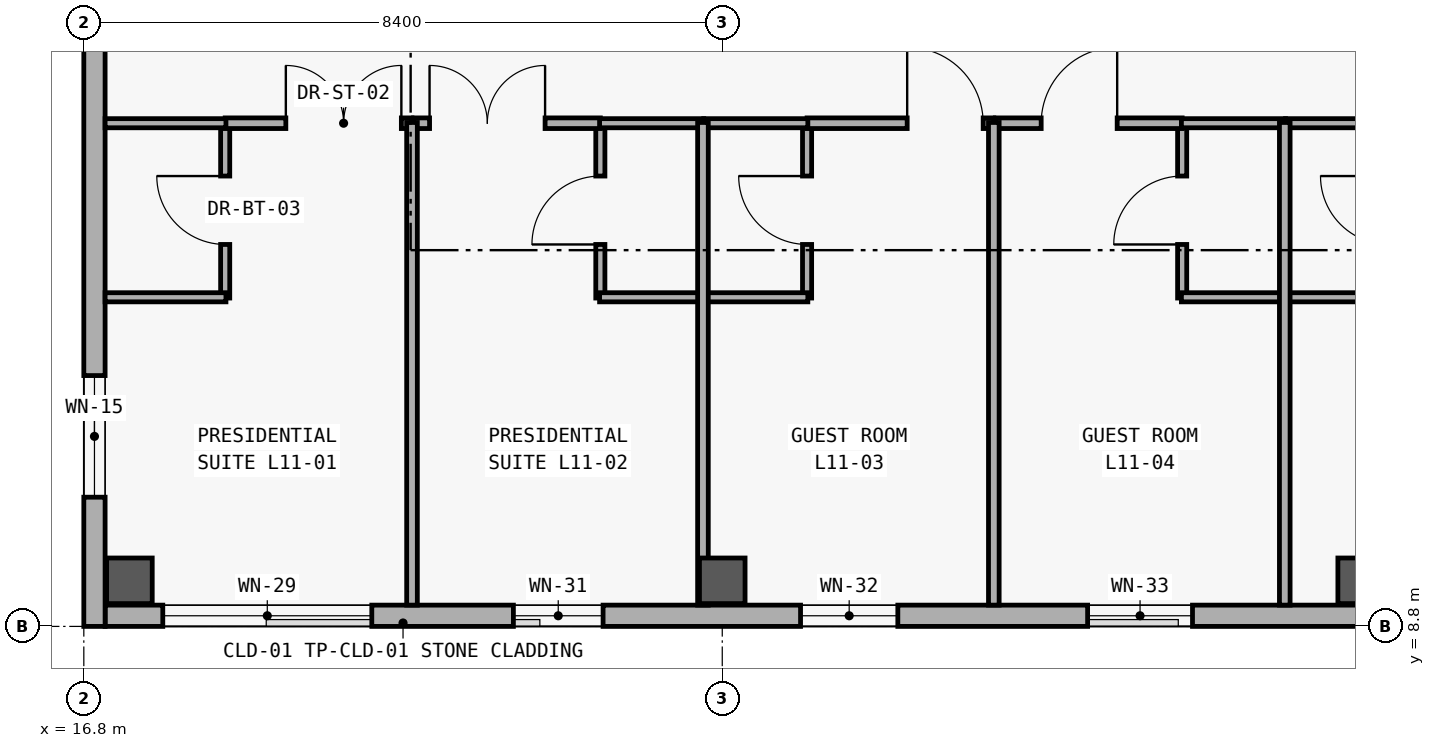
"""IFC4 building model, lengths in metres.
Left out: names, types, materials, properties, quantities, classifications, styles, units other than length and angle.
Written with IfcOpenShell. Run it as: python <this file> out.ifc"""

import sys

from ifc_helpers import new_model, si_unit, direction, frame, frame_2d, origin, origin_2d, place, context, subcontext, project, spatial, rectangle, extrude, element, fill, save


model = new_model("IFC4")
c1 = context("Model", 3, precision=1e-05, world=origin(), true_north=direction((0.0, 1.0)))
c2 = subcontext(c1, "Body", "Model", "MODEL_VIEW")
j1 = project(units=[si_unit("LENGTHUNIT", "METRE"), si_unit("PLANEANGLEUNIT", "RADIAN")], contexts=[c1])
p1 = place(None, origin())
s1 = spatial("IfcSite", under=j1, at=p1, CompositionType="ELEMENT")
p2 = place(p1, origin())
s2 = spatial("IfcBuilding", under=s1, at=p2, CompositionType="ELEMENT")
p3 = place(p2, frame((0.0, 0.0, 44.4)))
s3 = spatial("IfcBuildingStorey", under=s2, at=p3, CompositionType="ELEMENT", Elevation=44.4)
for number, where, z_axis, x_axis in (
    (1, (17.4, 9.4, 0.0), (0.0, 0.0, 1.0), (1.0, 0.0, 0.0)),
    (2, (25.2, 9.4, 0.0), (0.0, 0.0, 1.0), (1.0, 0.0, 0.0)),
    (3, (33.6, 9.4, 0.0), (0.0, 0.0, 1.0), (1.0, 0.0, 0.0)),
):
    element("IfcColumn", number, at=place(p3, frame(where, z_axis=z_axis, x_axis=x_axis)), inside=s3, PredefinedType="COLUMN", context=c2, shape_type="SweptSolid", body=[
        extrude(rectangle(XDim=0.6, YDim=0.6, at=origin_2d()), origin(), (0.0, 0.0, 1.0), 4.2),
    ])
p4 = place(p3, frame((66.92, 8.94, 0.0), z_axis=(0.0, 0.0, 1.0), x_axis=(-1.0, 0.0, 0.0)))
e4 = element("IfcWall", 4, at=p4, inside=s3, PredefinedType="SOLIDWALL", context=c2, shape_type="SweptSolid", body=[
    extrude(rectangle(XDim=49.84, YDim=0.28, at=frame_2d((24.92, 0.0))), origin(), (0.0, 0.0, 1.0), 3.96),
])
p5 = place(p4, frame((6.82, 0.0, 0.85)))
e5 = element("IfcOpeningElement", 5, at=p5, cuts=e4, PredefinedType="OPENING", context=c2, shape_type="SweptSolid", body=[
    extrude(rectangle(XDim=1.5, YDim=1.75, at=frame_2d((0.75, 0.875))), frame((0.0, 0.15, 0.0), z_axis=(0.0, -1.0, 0.0), x_axis=(1.0, 0.0, 0.0)), (0.0, 0.0, 1.0), 0.3),
])
p6 = place(p4, frame((46.331, 0.0, 0.85)))
e6 = element("IfcOpeningElement", 6, at=p6, cuts=e4, PredefinedType="OPENING", context=c2, shape_type="SweptSolid", body=[
    extrude(rectangle(XDim=2.75, YDim=2.1, at=frame_2d((1.375, 1.05))), frame((0.0, 0.15, 0.0), z_axis=(0.0, -1.0, 0.0), x_axis=(1.0, 0.0, 0.0)), (0.0, 0.0, 1.0), 0.3),
])
p7 = place(p4, frame((43.288, 0.0, 0.85)))
e7 = element("IfcOpeningElement", 7, at=p7, cuts=e4, PredefinedType="OPENING", context=c2, shape_type="SweptSolid", body=[
    extrude(rectangle(XDim=1.18, YDim=1.5, at=frame_2d((0.59, 0.75))), frame((0.0, 0.15, 0.0), z_axis=(0.0, -1.0, 0.0), x_axis=(1.0, 0.0, 0.0)), (0.0, 0.0, 1.0), 0.3),
])
p8 = place(p4, frame((39.41, 0.0, 0.85)))
e8 = element("IfcOpeningElement", 8, at=p8, cuts=e4, PredefinedType="OPENING", context=c2, shape_type="SweptSolid", body=[
    extrude(rectangle(XDim=1.28, YDim=1.6, at=frame_2d((0.64, 0.8))), frame((0.0, 0.15, 0.0), z_axis=(0.0, -1.0, 0.0), x_axis=(1.0, 0.0, 0.0)), (0.0, 0.0, 1.0), 0.3),
])
p9 = place(p4, frame((35.533, 0.0, 0.85)))
e9 = element("IfcOpeningElement", 9, at=p9, cuts=e4, PredefinedType="OPENING", context=c2, shape_type="SweptSolid", body=[
    extrude(rectangle(XDim=1.38, YDim=1.7, at=frame_2d((0.69, 0.85))), frame((0.0, 0.15, 0.0), z_axis=(0.0, -1.0, 0.0), x_axis=(1.0, 0.0, 0.0)), (0.0, 0.0, 1.0), 0.3),
])
p10 = place(p4, frame((31.655, 0.0, 0.85)))
e10 = element("IfcOpeningElement", 10, at=p10, cuts=e4, PredefinedType="OPENING", context=c2, shape_type="SweptSolid", body=[
    extrude(rectangle(XDim=1.48, YDim=1.8, at=frame_2d((0.74, 0.9))), frame((0.0, 0.15, 0.0), z_axis=(0.0, -1.0, 0.0), x_axis=(1.0, 0.0, 0.0)), (0.0, 0.0, 1.0), 0.3),
])
p11 = place(p4, frame((27.777, 0.0, 0.85)))
e11 = element("IfcOpeningElement", 11, at=p11, cuts=e4, PredefinedType="OPENING", context=c2, shape_type="SweptSolid", body=[
    extrude(rectangle(XDim=1.58, YDim=1.85, at=frame_2d((0.79, 0.925))), frame((0.0, 0.15, 0.0), z_axis=(0.0, -1.0, 0.0), x_axis=(1.0, 0.0, 0.0)), (0.0, 0.0, 1.0), 0.3),
])
p12 = place(p4, frame((23.899, 0.0, 0.85)))
e12 = element("IfcOpeningElement", 12, at=p12, cuts=e4, PredefinedType="OPENING", context=c2, shape_type="SweptSolid", body=[
    extrude(rectangle(XDim=1.68, YDim=1.9, at=frame_2d((0.84, 0.95))), frame((0.0, 0.15, 0.0), z_axis=(0.0, -1.0, 0.0), x_axis=(1.0, 0.0, 0.0)), (0.0, 0.0, 1.0), 0.3),
])
p13 = place(p4, frame((20.022, 0.0, 0.85)))
e13 = element("IfcOpeningElement", 13, at=p13, cuts=e4, PredefinedType="OPENING", context=c2, shape_type="SweptSolid", body=[
    extrude(rectangle(XDim=1.78, YDim=1.95, at=frame_2d((0.89, 0.975))), frame((0.0, 0.15, 0.0), z_axis=(0.0, -1.0, 0.0), x_axis=(1.0, 0.0, 0.0)), (0.0, 0.0, 1.0), 0.3),
])
p14 = place(p4, frame((16.144, 0.0, 0.85)))
e14 = element("IfcOpeningElement", 14, at=p14, cuts=e4, PredefinedType="OPENING", context=c2, shape_type="SweptSolid", body=[
    extrude(rectangle(XDim=1.88, YDim=1.95, at=frame_2d((0.94, 0.975))), frame((0.0, 0.15, 0.0), z_axis=(0.0, -1.0, 0.0), x_axis=(1.0, 0.0, 0.0)), (0.0, 0.0, 1.0), 0.3),
])
p15 = place(p3, frame((16.94, 8.8, 0.0), z_axis=(0.0, 0.0, 1.0), x_axis=(0.0, 1.0, 0.0)))
e15 = element("IfcWall", 15, at=p15, inside=s3, PredefinedType="SOLIDWALL", context=c2, shape_type="SweptSolid", body=[
    extrude(rectangle(XDim=25.2, YDim=0.28, at=frame_2d((12.6, 0.0))), origin(), (0.0, 0.0, 1.0), 3.96),
])
p16 = place(p15, frame((1.7, 0.0, 0.95)))
e16 = element("IfcOpeningElement", 16, at=p16, cuts=e15, PredefinedType="OPENING", context=c2, shape_type="SweptSolid", body=[
    extrude(rectangle(XDim=1.6, YDim=1.6, at=frame_2d((0.8, 0.8))), frame((0.0, 0.15, 0.0), z_axis=(0.0, -1.0, 0.0), x_axis=(1.0, 0.0, 0.0)), (0.0, 0.0, 1.0), 0.3),
])
p17 = place(p3, frame((18.66, 13.12, 0.0), z_axis=(0.0, 0.0, 1.0), x_axis=(0.0, 1.0, 0.0)))
e17 = element("IfcWall", 17, at=p17, inside=s3, PredefinedType="PARTITIONING", context=c2, shape_type="SweptSolid", body=[
    extrude(rectangle(XDim=2.31, YDim=0.12, at=frame_2d((1.155, 0.0))), origin(), (0.0, 0.0, 1.0), 3.06),
])
p18 = place(p17, frame((0.705, 0.0, 0.0)))
e18 = element("IfcOpeningElement", 18, at=p18, cuts=e17, PredefinedType="OPENING", context=c2, shape_type="SweptSolid", body=[
    extrude(rectangle(XDim=0.9, YDim=2.18, at=frame_2d((0.45, 1.09))), frame((0.0, 0.07, 0.0), z_axis=(0.0, -1.0, 0.0), x_axis=(1.0, 0.0, 0.0)), (0.0, 0.0, 1.0), 0.14),
])
p19 = place(p3, frame((23.596, 13.12, 0.0), z_axis=(0.0, 0.0, 1.0), x_axis=(0.0, 1.0, 0.0)))
e19 = element("IfcWall", 19, at=p19, inside=s3, PredefinedType="PARTITIONING", context=c2, shape_type="SweptSolid", body=[
    extrude(rectangle(XDim=2.31, YDim=0.12, at=frame_2d((1.155, 0.0))), origin(), (0.0, 0.0, 1.0), 3.06),
])
p20 = place(p19, frame((0.705, 0.0, 0.0)))
e20 = element("IfcOpeningElement", 20, at=p20, cuts=e19, PredefinedType="OPENING", context=c2, shape_type="SweptSolid", body=[
    extrude(rectangle(XDim=0.9, YDim=2.18, at=frame_2d((0.45, 1.09))), frame((0.0, 0.07, 0.0), z_axis=(0.0, -1.0, 0.0), x_axis=(1.0, 0.0, 0.0)), (0.0, 0.0, 1.0), 0.14),
])
p21 = place(p3, frame((26.316, 13.12, 0.0), z_axis=(0.0, 0.0, 1.0), x_axis=(0.0, 1.0, 0.0)))
e21 = element("IfcWall", 21, at=p21, inside=s3, PredefinedType="PARTITIONING", context=c2, shape_type="SweptSolid", body=[
    extrude(rectangle(XDim=2.31, YDim=0.12, at=frame_2d((1.155, 0.0))), origin(), (0.0, 0.0, 1.0), 3.06),
])
p22 = place(p21, frame((0.705, 0.0, 0.0)))
e22 = element("IfcOpeningElement", 22, at=p22, cuts=e21, PredefinedType="OPENING", context=c2, shape_type="SweptSolid", body=[
    extrude(rectangle(XDim=0.9, YDim=2.18, at=frame_2d((0.45, 1.09))), frame((0.0, 0.07, 0.0), z_axis=(0.0, -1.0, 0.0), x_axis=(1.0, 0.0, 0.0)), (0.0, 0.0, 1.0), 0.14),
])
p23 = place(p3, frame((31.251, 13.12, 0.0), z_axis=(0.0, 0.0, 1.0), x_axis=(0.0, 1.0, 0.0)))
e23 = element("IfcWall", 23, at=p23, inside=s3, PredefinedType="PARTITIONING", context=c2, shape_type="SweptSolid", body=[
    extrude(rectangle(XDim=2.31, YDim=0.12, at=frame_2d((1.155, 0.0))), origin(), (0.0, 0.0, 1.0), 3.06),
])
p24 = place(p23, frame((0.705, 0.0, 0.0)))
e24 = element("IfcOpeningElement", 24, at=p24, cuts=e23, PredefinedType="OPENING", context=c2, shape_type="SweptSolid", body=[
    extrude(rectangle(XDim=0.9, YDim=2.18, at=frame_2d((0.45, 1.09))), frame((0.0, 0.07, 0.0), z_axis=(0.0, -1.0, 0.0), x_axis=(1.0, 0.0, 0.0)), (0.0, 0.0, 1.0), 0.14),
])
p25 = place(p3, frame((18.66, 15.42, 0.0), z_axis=(0.0, 0.0, 1.0), x_axis=(1.0, 0.0, 0.0)))
e25 = element("IfcWall", 25, at=p25, inside=s3, PredefinedType="PARTITIONING", context=c2, shape_type="SweptSolid", body=[
    extrude(rectangle(XDim=2.458, YDim=0.14, at=frame_2d((1.229, 0.0))), origin(), (0.0, 0.0, 1.0), 3.06),
])
p26 = place(p25, frame((0.798, 0.0, 0.0)))
e26 = element("IfcOpeningElement", 26, at=p26, cuts=e25, PredefinedType="OPENING", context=c2, shape_type="SweptSolid", body=[
    extrude(rectangle(XDim=1.52, YDim=2.35, at=frame_2d((0.76, 1.175))), frame((0.0, 0.08, 0.0), z_axis=(0.0, -1.0, 0.0), x_axis=(1.0, 0.0, 0.0)), (0.0, 0.0, 1.0), 0.16),
])
p27 = place(p3, frame((21.138, 15.42, 0.0), z_axis=(0.0, 0.0, 1.0), x_axis=(1.0, 0.0, 0.0)))
e27 = element("IfcWall", 27, at=p27, inside=s3, PredefinedType="PARTITIONING", context=c2, shape_type="SweptSolid", body=[
    extrude(rectangle(XDim=2.458, YDim=0.14, at=frame_2d((1.229, 0.0))), origin(), (0.0, 0.0, 1.0), 3.06),
])
p28 = place(p27, frame((0.211, 0.0, 0.0)))
e28 = element("IfcOpeningElement", 28, at=p28, cuts=e27, PredefinedType="OPENING", context=c2, shape_type="SweptSolid", body=[
    extrude(rectangle(XDim=1.52, YDim=2.35, at=frame_2d((0.76, 1.175))), frame((0.0, 0.08, 0.0), z_axis=(0.0, -1.0, 0.0), x_axis=(1.0, 0.0, 0.0)), (0.0, 0.0, 1.0), 0.16),
])
p29 = place(p3, frame((26.316, 15.42, 0.0), z_axis=(0.0, 0.0, 1.0), x_axis=(1.0, 0.0, 0.0)))
e29 = element("IfcWall", 29, at=p29, inside=s3, PredefinedType="PARTITIONING", context=c2, shape_type="SweptSolid", body=[
    extrude(rectangle(XDim=2.457, YDim=0.14, at=frame_2d((1.229, 0.0))), origin(), (0.0, 0.0, 1.0), 3.06),
])
p30 = place(p29, frame((1.317, 0.0, 0.0)))
e30 = element("IfcOpeningElement", 30, at=p30, cuts=e29, PredefinedType="OPENING", context=c2, shape_type="SweptSolid", body=[
    extrude(rectangle(XDim=1.0, YDim=2.28, at=frame_2d((0.5, 1.14))), frame((0.0, 0.08, 0.0), z_axis=(0.0, -1.0, 0.0), x_axis=(1.0, 0.0, 0.0)), (0.0, 0.0, 1.0), 0.16),
])
p31 = place(p3, frame((28.793, 15.42, 0.0), z_axis=(0.0, 0.0, 1.0), x_axis=(1.0, 0.0, 0.0)))
e31 = element("IfcWall", 31, at=p31, inside=s3, PredefinedType="PARTITIONING", context=c2, shape_type="SweptSolid", body=[
    extrude(rectangle(XDim=2.458, YDim=0.14, at=frame_2d((1.229, 0.0))), origin(), (0.0, 0.0, 1.0), 3.06),
])
p32 = place(p31, frame((0.603, 0.0, 0.0)))
e32 = element("IfcOpeningElement", 32, at=p32, cuts=e31, PredefinedType="OPENING", context=c2, shape_type="SweptSolid", body=[
    extrude(rectangle(XDim=1.0, YDim=2.28, at=frame_2d((0.5, 1.14))), frame((0.0, 0.08, 0.0), z_axis=(0.0, -1.0, 0.0), x_axis=(1.0, 0.0, 0.0)), (0.0, 0.0, 1.0), 0.16),
])
for number, where, z_axis, x_axis in (
    (33, (17.08, 13.13, 0.0), (0.0, 0.0, 1.0), (1.0, 0.0, 0.0)),
    (34, (17.08, 15.42, 0.0), (0.0, 0.0, 1.0), (1.0, 0.0, 0.0)),
):
    element("IfcWall", number, at=place(p3, frame(where, z_axis=z_axis, x_axis=x_axis)), inside=s3, PredefinedType="PARTITIONING", context=c2, shape_type="SweptSolid", body=[
        extrude(rectangle(XDim=1.59, YDim=0.12, at=frame_2d((0.795, 0.0))), origin(), (0.0, 0.0, 1.0), 3.06),
    ])
for number, where, z_axis, x_axis in (
    (35, (23.586, 13.13, 0.0), (0.0, 0.0, 1.0), (1.0, 0.0, 0.0)),
    (36, (23.586, 15.42, 0.0), (0.0, 0.0, 1.0), (1.0, 0.0, 0.0)),
):
    element("IfcWall", number, at=place(p3, frame(where, z_axis=z_axis, x_axis=x_axis)), inside=s3, PredefinedType="PARTITIONING", context=c2, shape_type="SweptSolid", body=[
        extrude(rectangle(XDim=1.37, YDim=0.12, at=frame_2d((0.685, 0.0))), origin(), (0.0, 0.0, 1.0), 3.06),
    ])
for number, where, z_axis, x_axis in (
    (37, (24.956, 13.13, 0.0), (0.0, 0.0, 1.0), (1.0, 0.0, 0.0)),
    (38, (24.956, 15.42, 0.0), (0.0, 0.0, 1.0), (1.0, 0.0, 0.0)),
):
    element("IfcWall", number, at=place(p3, frame(where, z_axis=z_axis, x_axis=x_axis)), inside=s3, PredefinedType="PARTITIONING", context=c2, shape_type="SweptSolid", body=[
        extrude(rectangle(XDim=1.37, YDim=0.12, at=frame_2d((0.685, 0.0))), origin(), (0.0, 0.0, 1.0), 3.06),
    ])
for number, where, z_axis, x_axis in (
    (39, (31.241, 13.13, 0.0), (0.0, 0.0, 1.0), (1.0, 0.0, 0.0)),
    (40, (31.241, 15.42, 0.0), (0.0, 0.0, 1.0), (1.0, 0.0, 0.0)),
):
    element("IfcWall", number, at=place(p3, frame(where, z_axis=z_axis, x_axis=x_axis)), inside=s3, PredefinedType="PARTITIONING", context=c2, shape_type="SweptSolid", body=[
        extrude(rectangle(XDim=1.37, YDim=0.12, at=frame_2d((0.685, 0.0))), origin(), (0.0, 0.0, 1.0), 3.06),
    ])
p33 = place(p3, frame((32.611, 13.13, 0.0), z_axis=(0.0, 0.0, 1.0), x_axis=(1.0, 0.0, 0.0)))
e41 = element("IfcWall", 41, at=p33, inside=s3, PredefinedType="PARTITIONING", context=c2, shape_type="SweptSolid", body=[
    extrude(rectangle(XDim=1.37, YDim=0.12, at=frame_2d((0.685, 0.0))), origin(), (0.0, 0.0, 1.0), 3.06),
])
p34 = place(p3, frame((32.611, 15.42, 0.0), z_axis=(0.0, 0.0, 1.0), x_axis=(1.0, 0.0, 0.0)))
e42 = element("IfcWall", 42, at=p34, inside=s3, PredefinedType="PARTITIONING", context=c2, shape_type="SweptSolid", body=[
    extrude(rectangle(XDim=1.36, YDim=0.12, at=frame_2d((0.68, 0.0))), origin(), (0.0, 0.0, 1.0), 3.06),
])
for number, where, z_axis, x_axis in (
    (43, (21.118, 9.08, 0.0), (0.0, 0.0, 1.0), (0.0, 1.0, 0.0)),
    (44, (24.946, 9.08, 0.0), (0.0, 0.0, 1.0), (0.0, 1.0, 0.0)),
    (45, (28.773, 9.08, 0.0), (0.0, 0.0, 1.0), (0.0, 1.0, 0.0)),
    (46, (32.601, 9.08, 0.0), (0.0, 0.0, 1.0), (0.0, 1.0, 0.0)),
):
    element("IfcWall", number, at=place(p3, frame(where, z_axis=z_axis, x_axis=x_axis)), inside=s3, PredefinedType="PARTITIONING", context=c2, shape_type="SweptSolid", body=[
        extrude(rectangle(XDim=6.35, YDim=0.14, at=frame_2d((3.175, 0.0))), origin(), (0.0, 0.0, 1.0), 3.06),
    ])
p35 = place(p6, origin())
e47 = element("IfcWindow", 47, at=p35, inside=s3, PartitioningType="SINGLE_PANEL", PredefinedType="WINDOW", context=c2, shape_type="SweptSolid", body=[
    extrude(rectangle(XDim=2.75, YDim=2.1, at=frame_2d((1.375, 1.05))), frame((0.0, 0.03, 0.0), z_axis=(0.0, -1.0, 0.0), x_axis=(1.0, 0.0, 0.0)), (0.0, 0.0, 1.0), 0.06),
])
fill(e6, e47)
p36 = place(p7, origin())
e48 = element("IfcWindow", 48, at=p36, inside=s3, PartitioningType="SINGLE_PANEL", PredefinedType="WINDOW", context=c2, shape_type="SweptSolid", body=[
    extrude(rectangle(XDim=1.18, YDim=1.5, at=frame_2d((0.59, 0.75))), frame((0.0, 0.03, 0.0), z_axis=(0.0, -1.0, 0.0), x_axis=(1.0, 0.0, 0.0)), (0.0, 0.0, 1.0), 0.06),
])
fill(e7, e48)
p37 = place(p8, origin())
e49 = element("IfcWindow", 49, at=p37, inside=s3, PartitioningType="SINGLE_PANEL", PredefinedType="WINDOW", context=c2, shape_type="SweptSolid", body=[
    extrude(rectangle(XDim=1.28, YDim=1.6, at=frame_2d((0.64, 0.8))), frame((0.0, 0.03, 0.0), z_axis=(0.0, -1.0, 0.0), x_axis=(1.0, 0.0, 0.0)), (0.0, 0.0, 1.0), 0.06),
])
fill(e8, e49)
p38 = place(p9, origin())
e50 = element("IfcWindow", 50, at=p38, inside=s3, PartitioningType="SINGLE_PANEL", PredefinedType="WINDOW", context=c2, shape_type="SweptSolid", body=[
    extrude(rectangle(XDim=1.38, YDim=1.7, at=frame_2d((0.69, 0.85))), frame((0.0, 0.03, 0.0), z_axis=(0.0, -1.0, 0.0), x_axis=(1.0, 0.0, 0.0)), (0.0, 0.0, 1.0), 0.06),
])
fill(e9, e50)
p39 = place(p16, origin())
e51 = element("IfcWindow", 51, at=p39, inside=s3, PartitioningType="SINGLE_PANEL", PredefinedType="WINDOW", context=c2, shape_type="SweptSolid", body=[
    extrude(rectangle(XDim=1.6, YDim=1.6, at=frame_2d((0.8, 0.8))), frame((0.0, 0.03, 0.0), z_axis=(0.0, -1.0, 0.0), x_axis=(1.0, 0.0, 0.0)), (0.0, 0.0, 1.0), 0.06),
])
fill(e16, e51)
p40 = place(p18, origin())
e52 = element("IfcDoor", 52, at=p40, inside=s3, OperationType="SINGLE_SWING_RIGHT", PredefinedType="DOOR", context=c2, shape_type="SweptSolid", body=[
    extrude(rectangle(XDim=0.9, YDim=2.18, at=frame_2d((0.45, 1.09))), frame((0.0, 0.025, 0.0), z_axis=(0.0, -1.0, 0.0), x_axis=(1.0, 0.0, 0.0)), (0.0, 0.0, 1.0), 0.05),
])
fill(e18, e52)
p41 = place(p20, origin())
e53 = element("IfcDoor", 53, at=p41, inside=s3, OperationType="SINGLE_SWING_LEFT", PredefinedType="DOOR", context=c2, shape_type="SweptSolid", body=[
    extrude(rectangle(XDim=0.9, YDim=2.18, at=frame_2d((0.45, 1.09))), frame((0.0, 0.025, 0.0), z_axis=(0.0, -1.0, 0.0), x_axis=(1.0, 0.0, 0.0)), (0.0, 0.0, 1.0), 0.05),
])
fill(e20, e53)
p42 = place(p22, origin())
e54 = element("IfcDoor", 54, at=p42, inside=s3, OperationType="SINGLE_SWING_RIGHT", PredefinedType="DOOR", context=c2, shape_type="SweptSolid", body=[
    extrude(rectangle(XDim=0.9, YDim=2.18, at=frame_2d((0.45, 1.09))), frame((0.0, 0.025, 0.0), z_axis=(0.0, -1.0, 0.0), x_axis=(1.0, 0.0, 0.0)), (0.0, 0.0, 1.0), 0.05),
])
fill(e22, e54)
p43 = place(p24, origin())
e55 = element("IfcDoor", 55, at=p43, inside=s3, OperationType="SINGLE_SWING_LEFT", PredefinedType="DOOR", context=c2, shape_type="SweptSolid", body=[
    extrude(rectangle(XDim=0.9, YDim=2.18, at=frame_2d((0.45, 1.09))), frame((0.0, 0.025, 0.0), z_axis=(0.0, -1.0, 0.0), x_axis=(1.0, 0.0, 0.0)), (0.0, 0.0, 1.0), 0.05),
])
fill(e24, e55)
p44 = place(p26, origin())
e56 = element("IfcDoor", 56, at=p44, inside=s3, OperationType="DOUBLE_DOOR_SINGLE_SWING", PredefinedType="DOOR", context=c2, shape_type="SweptSolid", body=[
    extrude(rectangle(XDim=1.52, YDim=2.35, at=frame_2d((0.76, 1.175))), frame((0.0, 0.025, 0.0), z_axis=(0.0, -1.0, 0.0), x_axis=(1.0, 0.0, 0.0)), (0.0, 0.0, 1.0), 0.05),
])
fill(e26, e56)
p45 = place(p28, origin())
e57 = element("IfcDoor", 57, at=p45, inside=s3, OperationType="DOUBLE_DOOR_SINGLE_SWING", PredefinedType="DOOR", context=c2, shape_type="SweptSolid", body=[
    extrude(rectangle(XDim=1.52, YDim=2.35, at=frame_2d((0.76, 1.175))), frame((0.0, 0.025, 0.0), z_axis=(0.0, -1.0, 0.0), x_axis=(1.0, 0.0, 0.0)), (0.0, 0.0, 1.0), 0.05),
])
fill(e28, e57)
p46 = place(p30, origin())
e58 = element("IfcDoor", 58, at=p46, inside=s3, OperationType="SINGLE_SWING_LEFT", PredefinedType="DOOR", context=c2, shape_type="SweptSolid", body=[
    extrude(rectangle(XDim=1.0, YDim=2.28, at=frame_2d((0.5, 1.14))), frame((0.0, 0.025, 0.0), z_axis=(0.0, -1.0, 0.0), x_axis=(1.0, 0.0, 0.0)), (0.0, 0.0, 1.0), 0.05),
])
fill(e30, e58)
p47 = place(p32, origin())
e59 = element("IfcDoor", 59, at=p47, inside=s3, OperationType="SINGLE_SWING_RIGHT", PredefinedType="DOOR", context=c2, shape_type="SweptSolid", body=[
    extrude(rectangle(XDim=1.0, YDim=2.28, at=frame_2d((0.5, 1.14))), frame((0.0, 0.025, 0.0), z_axis=(0.0, -1.0, 0.0), x_axis=(1.0, 0.0, 0.0)), (0.0, 0.0, 1.0), 0.05),
])
fill(e32, e59)
save(model, sys.argv[1])
